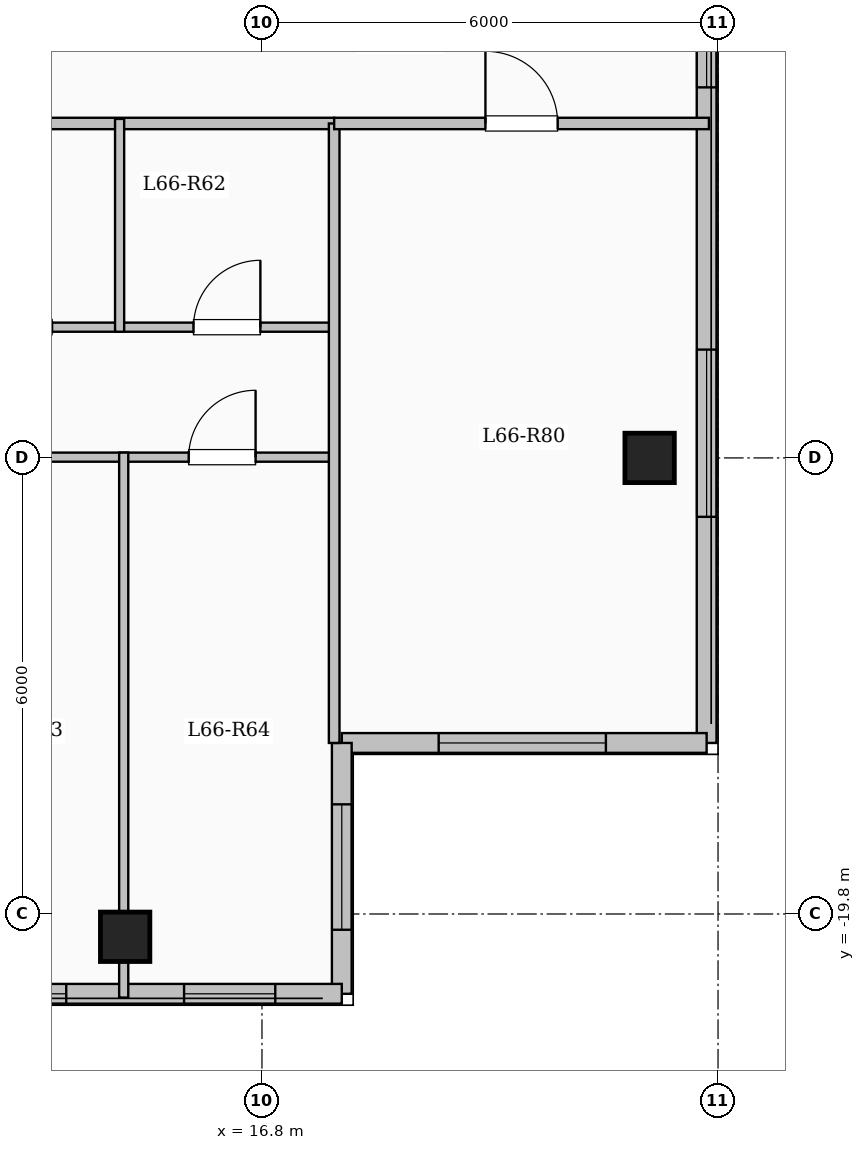
"""IFC4 building model, lengths in metres.
Left out: names, types, materials, properties, quantities, classifications, styles, units other than length and angle.
Written with IfcOpenShell. Run it as: python <this file> out.ifc"""

import sys

from ifc_helpers import new_model, si_unit, direction, frame, frame_2d, origin, origin_2d, place, context, subcontext, project, spatial, rectangle, extrude, element, fill, save


model = new_model("IFC4")
c1 = context("Model", 3, precision=1e-05, world=origin(), true_north=direction((0.0, 1.0)))
c2 = subcontext(c1, "Body", "Model", "MODEL_VIEW")
j1 = project(units=[si_unit("LENGTHUNIT", "METRE"), si_unit("PLANEANGLEUNIT", "RADIAN")], contexts=[c1])
p1 = place(None, origin())
s1 = spatial("IfcSite", under=j1, at=p1, CompositionType="ELEMENT")
p2 = place(p1, origin())
s2 = spatial("IfcBuilding", under=s1, at=p2, CompositionType="ELEMENT")
p3 = place(p2, frame((0.0, 0.0, 244.85)))
s3 = spatial("IfcBuildingStorey", under=s2, at=p3, CompositionType="ELEMENT", Elevation=244.85)
for number, where, z_axis, x_axis in (
    (1, (15.0, -20.1, 0.0), (0.0, 0.0, 1.0), (1.0, 0.0, 0.0)),
    (2, (21.9, -13.8, 0.0), (0.0, 0.0, 1.0), (1.0, 0.0, 0.0)),
):
    element("IfcColumn", number, at=place(p3, frame(where, z_axis=z_axis, x_axis=x_axis)), inside=s3, PredefinedType="COLUMN", context=c2, shape_type="SweptSolid", body=[
        extrude(rectangle(XDim=0.65, YDim=0.65, at=origin_2d()), origin(), (0.0, 0.0, 1.0), 3.35),
    ])
p4 = place(p3, frame((22.65, 17.55, 0.0), z_axis=(0.0, 0.0, 1.0), x_axis=(0.0, -1.0, 0.0)))
e3 = element("IfcWall", 3, at=p4, inside=s3, PredefinedType="SOLIDWALL", context=c2, shape_type="SweptSolid", body=[
    extrude(rectangle(XDim=35.1, YDim=0.26, at=frame_2d((17.55, 0.0))), origin(), (0.0, 0.0, 1.0), 3.1),
])
p5 = place(p4, frame((1.525, 0.0, 0.9)))
e4 = element("IfcOpeningElement", 4, at=p5, cuts=e3, PredefinedType="OPENING", context=c2, shape_type="SweptSolid", body=[
    extrude(rectangle(XDim=2.0, YDim=1.7, at=frame_2d((1.0, 0.85))), frame((0.0, 0.14, 0.0), z_axis=(0.0, -1.0, 0.0), x_axis=(1.0, 0.0, 0.0)), (0.0, 0.0, 1.0), 0.28),
])
p6 = place(p4, frame((5.425, 0.0, 0.95)))
e5 = element("IfcOpeningElement", 5, at=p6, cuts=e3, PredefinedType="OPENING", context=c2, shape_type="SweptSolid", body=[
    extrude(rectangle(XDim=1.0, YDim=1.5, at=frame_2d((0.5, 0.75))), frame((0.0, 0.14, 0.0), z_axis=(0.0, -1.0, 0.0), x_axis=(1.0, 0.0, 0.0)), (0.0, 0.0, 1.0), 0.28),
])
p7 = place(p4, frame((8.675, 0.0, 0.9)))
e6 = element("IfcOpeningElement", 6, at=p7, cuts=e3, PredefinedType="OPENING", context=c2, shape_type="SweptSolid", body=[
    extrude(rectangle(XDim=2.0, YDim=1.7, at=frame_2d((1.0, 0.85))), frame((0.0, 0.14, 0.0), z_axis=(0.0, -1.0, 0.0), x_axis=(1.0, 0.0, 0.0)), (0.0, 0.0, 1.0), 0.28),
])
p8 = place(p4, frame((13.5, 0.0, 0.9)))
e7 = element("IfcOpeningElement", 7, at=p8, cuts=e3, PredefinedType="OPENING", context=c2, shape_type="SweptSolid", body=[
    extrude(rectangle(XDim=1.65, YDim=1.6, at=frame_2d((0.825, 0.8))), frame((0.0, 0.14, 0.0), z_axis=(0.0, -1.0, 0.0), x_axis=(1.0, 0.0, 0.0)), (0.0, 0.0, 1.0), 0.28),
])
p9 = place(p4, frame((19.35, 0.0, 0.9)))
e8 = element("IfcOpeningElement", 8, at=p9, cuts=e3, PredefinedType="OPENING", context=c2, shape_type="SweptSolid", body=[
    extrude(rectangle(XDim=2.2, YDim=1.75, at=frame_2d((1.1, 0.875))), frame((0.0, 0.14, 0.0), z_axis=(0.0, -1.0, 0.0), x_axis=(1.0, 0.0, 0.0)), (0.0, 0.0, 1.0), 0.28),
])
p10 = place(p4, frame((25.275, 0.0, 0.95)))
e9 = element("IfcOpeningElement", 9, at=p10, cuts=e3, PredefinedType="OPENING", context=c2, shape_type="SweptSolid", body=[
    extrude(rectangle(XDim=1.2, YDim=1.5, at=frame_2d((0.6, 0.75))), frame((0.0, 0.14, 0.0), z_axis=(0.0, -1.0, 0.0), x_axis=(1.0, 0.0, 0.0)), (0.0, 0.0, 1.0), 0.28),
])
p11 = place(p4, frame((29.925, 0.0, 0.9)))
e10 = element("IfcOpeningElement", 10, at=p11, cuts=e3, PredefinedType="OPENING", context=c2, shape_type="SweptSolid", body=[
    extrude(rectangle(XDim=2.2, YDim=1.75, at=frame_2d((1.1, 0.875))), frame((0.0, 0.14, 0.0), z_axis=(0.0, -1.0, 0.0), x_axis=(1.0, 0.0, 0.0)), (0.0, 0.0, 1.0), 0.28),
])
p12 = place(p3, frame((22.65, -17.55, 0.0), z_axis=(0.0, 0.0, 1.0), x_axis=(-1.0, 0.0, 0.0)))
e11 = element("IfcWall", 11, at=p12, inside=s3, PredefinedType="SOLIDWALL", context=c2, shape_type="SweptSolid", body=[
    extrude(rectangle(XDim=4.8, YDim=0.26, at=frame_2d((2.4, 0.0))), origin(), (0.0, 0.0, 1.0), 3.1),
])
p13 = place(p12, frame((1.325, 0.0, 0.9)))
e12 = element("IfcOpeningElement", 12, at=p13, cuts=e11, PredefinedType="OPENING", context=c2, shape_type="SweptSolid", body=[
    extrude(rectangle(XDim=2.2, YDim=1.75, at=frame_2d((1.1, 0.875))), frame((0.0, 0.14, 0.0), z_axis=(0.0, -1.0, 0.0), x_axis=(1.0, 0.0, 0.0)), (0.0, 0.0, 1.0), 0.28),
])
p14 = place(p3, frame((17.85, -17.55, 0.0), z_axis=(0.0, 0.0, 1.0), x_axis=(0.0, -1.0, 0.0)))
e13 = element("IfcWall", 13, at=p14, inside=s3, PredefinedType="SOLIDWALL", context=c2, shape_type="SweptSolid", body=[
    extrude(rectangle(XDim=3.3, YDim=0.26, at=frame_2d((1.65, 0.0))), origin(), (0.0, 0.0, 1.0), 3.1),
])
p15 = place(p14, frame((0.808, 0.0, 0.9)))
e14 = element("IfcOpeningElement", 14, at=p15, cuts=e13, PredefinedType="OPENING", context=c2, shape_type="SweptSolid", body=[
    extrude(rectangle(XDim=1.65, YDim=1.6, at=frame_2d((0.825, 0.8))), frame((0.0, 0.14, 0.0), z_axis=(0.0, -1.0, 0.0), x_axis=(1.0, 0.0, 0.0)), (0.0, 0.0, 1.0), 0.28),
])
p16 = place(p3, frame((17.85, -20.85, 0.0), z_axis=(0.0, 0.0, 1.0), x_axis=(-1.0, 0.0, 0.0)))
e15 = element("IfcWall", 15, at=p16, inside=s3, PredefinedType="SOLIDWALL", context=c2, shape_type="SweptSolid", body=[
    extrude(rectangle(XDim=10.5, YDim=0.26, at=frame_2d((5.25, 0.0))), origin(), (0.0, 0.0, 1.0), 3.1),
])
p17 = place(p16, frame((0.875, 0.0, 0.95)))
e16 = element("IfcOpeningElement", 16, at=p17, cuts=e15, PredefinedType="OPENING", context=c2, shape_type="SweptSolid", body=[
    extrude(rectangle(XDim=1.2, YDim=1.5, at=frame_2d((0.6, 0.75))), frame((0.0, 0.14, 0.0), z_axis=(0.0, -1.0, 0.0), x_axis=(1.0, 0.0, 0.0)), (0.0, 0.0, 1.0), 0.28),
])
p18 = place(p16, frame((3.625, 0.0, 0.95)))
e17 = element("IfcOpeningElement", 17, at=p18, cuts=e15, PredefinedType="OPENING", context=c2, shape_type="SweptSolid", body=[
    extrude(rectangle(XDim=1.2, YDim=1.5, at=frame_2d((0.6, 0.75))), frame((0.0, 0.14, 0.0), z_axis=(0.0, -1.0, 0.0), x_axis=(1.0, 0.0, 0.0)), (0.0, 0.0, 1.0), 0.28),
])
p19 = place(p16, frame((6.6, 0.0, 0.9)))
e18 = element("IfcOpeningElement", 18, at=p19, cuts=e15, PredefinedType="OPENING", context=c2, shape_type="SweptSolid", body=[
    extrude(rectangle(XDim=1.65, YDim=1.6, at=frame_2d((0.825, 0.8))), frame((0.0, 0.14, 0.0), z_axis=(0.0, -1.0, 0.0), x_axis=(1.0, 0.0, 0.0)), (0.0, 0.0, 1.0), 0.28),
])
p20 = place(p16, frame((9.505, 0.0, 0.95)))
e19 = element("IfcOpeningElement", 19, at=p20, cuts=e15, PredefinedType="OPENING", context=c2, shape_type="SweptSolid", body=[
    extrude(rectangle(XDim=0.85, YDim=1.5, at=frame_2d((0.425, 0.75))), frame((0.0, 0.14, 0.0), z_axis=(0.0, -1.0, 0.0), x_axis=(1.0, 0.0, 0.0)), (0.0, 0.0, 1.0), 0.28),
])
p21 = place(p3, frame((8.55, -9.4, 0.0), z_axis=(0.0, 0.0, 1.0), x_axis=(1.0, 0.0, 0.0)))
e20 = element("IfcWall", 20, at=p21, inside=s3, PredefinedType="PARTITIONING", context=c2, shape_type="SweptSolid", body=[
    extrude(rectangle(XDim=9.2, YDim=0.15, at=frame_2d((4.6, 0.0))), origin(), (0.0, 0.0, 1.0), 3.1),
])
p22 = place(p21, frame((0.75, 0.0, 0.0)))
e21 = element("IfcOpeningElement", 21, at=p22, cuts=e20, PredefinedType="OPENING", context=c2, shape_type="SweptSolid", body=[
    extrude(rectangle(XDim=0.96, YDim=2.15, at=frame_2d((0.48, 1.075))), frame((0.0, 0.085, 0.0), z_axis=(0.0, -1.0, 0.0), x_axis=(1.0, 0.0, 0.0)), (0.0, 0.0, 1.0), 0.17),
])
p23 = place(p3, frame((12.272, -12.08, 0.0), z_axis=(0.0, 0.0, 1.0), x_axis=(1.0, 0.0, 0.0)))
e22 = element("IfcWall", 22, at=p23, inside=s3, PredefinedType="PARTITIONING", context=c2, shape_type="SweptSolid", body=[
    extrude(rectangle(XDim=2.655, YDim=0.12, at=frame_2d((1.328, 0.0))), origin(), (0.0, 0.0, 1.0), 2.785),
])
p24 = place(p23, frame((0.887, 0.0, 0.0)))
e23 = element("IfcOpeningElement", 23, at=p24, cuts=e22, PredefinedType="OPENING", context=c2, shape_type="SweptSolid", body=[
    extrude(rectangle(XDim=0.88, YDim=2.1, at=frame_2d((0.44, 1.05))), frame((0.0, 0.07, 0.0), z_axis=(0.0, -1.0, 0.0), x_axis=(1.0, 0.0, 0.0)), (0.0, 0.0, 1.0), 0.14),
])
p25 = place(p3, frame((14.927, -12.08, 0.0), z_axis=(0.0, 0.0, 1.0), x_axis=(1.0, 0.0, 0.0)))
e24 = element("IfcWall", 24, at=p25, inside=s3, PredefinedType="PARTITIONING", context=c2, shape_type="SweptSolid", body=[
    extrude(rectangle(XDim=2.823, YDim=0.12, at=frame_2d((1.412, 0.0))), origin(), (0.0, 0.0, 1.0), 3.1),
])
p26 = place(p25, frame((0.972, 0.0, 0.0)))
e25 = element("IfcOpeningElement", 25, at=p26, cuts=e24, PredefinedType="OPENING", context=c2, shape_type="SweptSolid", body=[
    extrude(rectangle(XDim=0.88, YDim=2.1, at=frame_2d((0.44, 1.05))), frame((0.0, 0.07, 0.0), z_axis=(0.0, -1.0, 0.0), x_axis=(1.0, 0.0, 0.0)), (0.0, 0.0, 1.0), 0.14),
])
p27 = place(p3, frame((12.212, -13.79, 0.0), z_axis=(0.0, 0.0, 1.0), x_axis=(1.0, 0.0, 0.0)))
e26 = element("IfcWall", 26, at=p27, inside=s3, PredefinedType="PARTITIONING", context=c2, shape_type="SweptSolid", body=[
    extrude(rectangle(XDim=5.598, YDim=0.12, at=frame_2d((2.799, 0.0))), origin(), (0.0, 0.0, 1.0), 2.785),
])
p28 = place(p27, frame((0.915, 0.0, 0.0)))
e27 = element("IfcOpeningElement", 27, at=p28, cuts=e26, PredefinedType="OPENING", context=c2, shape_type="SweptSolid", body=[
    extrude(rectangle(XDim=0.88, YDim=2.1, at=frame_2d((0.44, 1.05))), frame((0.0, 0.07, 0.0), z_axis=(0.0, -1.0, 0.0), x_axis=(1.0, 0.0, 0.0)), (0.0, 0.0, 1.0), 0.14),
])
p29 = place(p27, frame((3.624, 0.0, 0.0)))
e28 = element("IfcOpeningElement", 28, at=p29, cuts=e26, PredefinedType="OPENING", context=c2, shape_type="SweptSolid", body=[
    extrude(rectangle(XDim=0.88, YDim=2.1, at=frame_2d((0.44, 1.05))), frame((0.0, 0.07, 0.0), z_axis=(0.0, -1.0, 0.0), x_axis=(1.0, 0.0, 0.0)), (0.0, 0.0, 1.0), 0.14),
])
p30 = place(p3, frame((14.927, -12.14, 0.0), z_axis=(0.0, 0.0, 1.0), x_axis=(0.0, 1.0, 0.0)))
e29 = element("IfcWall", 29, at=p30, inside=s3, PredefinedType="PARTITIONING", context=c2, shape_type="SweptSolid", body=[
    extrude(rectangle(XDim=2.8, YDim=0.12, at=frame_2d((1.4, 0.0))), origin(), (0.0, 0.0, 1.0), 2.685),
])
p31 = place(p3, frame((14.981, -20.9, 0.0), z_axis=(0.0, 0.0, 1.0), x_axis=(0.0, 1.0, 0.0)))
e30 = element("IfcWall", 30, at=p31, inside=s3, PredefinedType="PARTITIONING", context=c2, shape_type="SweptSolid", body=[
    extrude(rectangle(XDim=7.17, YDim=0.12, at=frame_2d((3.585, 0.0))), origin(), (0.0, 0.0, 1.0), 2.685),
])
p32 = place(p3, frame((17.75, -17.55, 0.0), z_axis=(0.0, 0.0, 1.0), x_axis=(0.0, 1.0, 0.0)))
e31 = element("IfcWall", 31, at=p32, inside=s3, PredefinedType="PARTITIONING", context=c2, shape_type="SweptSolid", body=[
    extrude(rectangle(XDim=8.15, YDim=0.14, at=frame_2d((4.075, 0.0))), origin(), (0.0, 0.0, 1.0), 3.1),
])
p33 = place(p3, frame((17.75, -9.4, 0.0), z_axis=(0.0, 0.0, 1.0), x_axis=(1.0, 0.0, 0.0)))
e32 = element("IfcWall", 32, at=p33, inside=s3, PredefinedType="PARTITIONING", context=c2, shape_type="SweptSolid", body=[
    extrude(rectangle(XDim=4.93, YDim=0.15, at=frame_2d((2.465, 0.0))), origin(), (0.0, 0.0, 1.0), 3.1),
])
p34 = place(p33, frame((1.99, 0.0, 0.0)))
e33 = element("IfcOpeningElement", 33, at=p34, cuts=e32, PredefinedType="OPENING", context=c2, shape_type="SweptSolid", body=[
    extrude(rectangle(XDim=0.95, YDim=2.15, at=frame_2d((0.475, 1.075))), frame((0.0, 0.085, 0.0), z_axis=(0.0, -1.0, 0.0), x_axis=(1.0, 0.0, 0.0)), (0.0, 0.0, 1.0), 0.17),
])
p35 = place(p10, origin())
e34 = element("IfcWindow", 34, at=p35, inside=s3, PartitioningType="SINGLE_PANEL", PredefinedType="WINDOW", context=c2, shape_type="SweptSolid", body=[
    extrude(rectangle(XDim=1.2, YDim=1.5, at=frame_2d((0.6, 0.75))), frame((0.0, 0.03, 0.0), z_axis=(0.0, -1.0, 0.0), x_axis=(1.0, 0.0, 0.0)), (0.0, 0.0, 1.0), 0.06),
])
fill(e9, e34)
p36 = place(p11, origin())
e35 = element("IfcWindow", 35, at=p36, inside=s3, PartitioningType="SINGLE_PANEL", PredefinedType="WINDOW", context=c2, shape_type="SweptSolid", body=[
    extrude(rectangle(XDim=2.2, YDim=1.75, at=frame_2d((1.1, 0.875))), frame((0.0, 0.03, 0.0), z_axis=(0.0, -1.0, 0.0), x_axis=(1.0, 0.0, 0.0)), (0.0, 0.0, 1.0), 0.06),
])
fill(e10, e35)
p37 = place(p13, origin())
e36 = element("IfcWindow", 36, at=p37, inside=s3, PartitioningType="SINGLE_PANEL", PredefinedType="WINDOW", context=c2, shape_type="SweptSolid", body=[
    extrude(rectangle(XDim=2.2, YDim=1.75, at=frame_2d((1.1, 0.875))), frame((0.0, 0.03, 0.0), z_axis=(0.0, -1.0, 0.0), x_axis=(1.0, 0.0, 0.0)), (0.0, 0.0, 1.0), 0.06),
])
fill(e12, e36)
p38 = place(p15, origin())
e37 = element("IfcWindow", 37, at=p38, inside=s3, PartitioningType="SINGLE_PANEL", PredefinedType="WINDOW", context=c2, shape_type="SweptSolid", body=[
    extrude(rectangle(XDim=1.65, YDim=1.6, at=frame_2d((0.825, 0.8))), frame((0.0, 0.03, 0.0), z_axis=(0.0, -1.0, 0.0), x_axis=(1.0, 0.0, 0.0)), (0.0, 0.0, 1.0), 0.06),
])
fill(e14, e37)
p39 = place(p17, origin())
e38 = element("IfcWindow", 38, at=p39, inside=s3, PartitioningType="SINGLE_PANEL", PredefinedType="WINDOW", context=c2, shape_type="SweptSolid", body=[
    extrude(rectangle(XDim=1.2, YDim=1.5, at=frame_2d((0.6, 0.75))), frame((0.0, 0.03, 0.0), z_axis=(0.0, -1.0, 0.0), x_axis=(1.0, 0.0, 0.0)), (0.0, 0.0, 1.0), 0.06),
])
fill(e16, e38)
p40 = place(p18, origin())
e39 = element("IfcWindow", 39, at=p40, inside=s3, PartitioningType="SINGLE_PANEL", PredefinedType="WINDOW", context=c2, shape_type="SweptSolid", body=[
    extrude(rectangle(XDim=1.2, YDim=1.5, at=frame_2d((0.6, 0.75))), frame((0.0, 0.03, 0.0), z_axis=(0.0, -1.0, 0.0), x_axis=(1.0, 0.0, 0.0)), (0.0, 0.0, 1.0), 0.06),
])
fill(e17, e39)
p41 = place(p26, origin())
e40 = element("IfcDoor", 40, at=p41, inside=s3, OperationType="SINGLE_SWING_RIGHT", PredefinedType="DOOR", context=c2, shape_type="SweptSolid", body=[
    extrude(rectangle(XDim=0.88, YDim=2.1, at=frame_2d((0.44, 1.05))), frame((0.0, 0.025, 0.0), z_axis=(0.0, -1.0, 0.0), x_axis=(1.0, 0.0, 0.0)), (0.0, 0.0, 1.0), 0.05),
])
fill(e25, e40)
p42 = place(p29, origin())
e41 = element("IfcDoor", 41, at=p42, inside=s3, OperationType="SINGLE_SWING_RIGHT", PredefinedType="DOOR", context=c2, shape_type="SweptSolid", body=[
    extrude(rectangle(XDim=0.88, YDim=2.1, at=frame_2d((0.44, 1.05))), frame((0.0, 0.025, 0.0), z_axis=(0.0, -1.0, 0.0), x_axis=(1.0, 0.0, 0.0)), (0.0, 0.0, 1.0), 0.05),
])
fill(e28, e41)
p43 = place(p34, origin())
e42 = element("IfcDoor", 42, at=p43, inside=s3, OperationType="SINGLE_SWING_LEFT", PredefinedType="DOOR", context=c2, shape_type="SweptSolid", body=[
    extrude(rectangle(XDim=0.95, YDim=2.15, at=frame_2d((0.475, 1.075))), frame((0.0, 0.025, 0.0), z_axis=(0.0, -1.0, 0.0), x_axis=(1.0, 0.0, 0.0)), (0.0, 0.0, 1.0), 0.05),
])
fill(e33, e42)
save(model, sys.argv[1])
